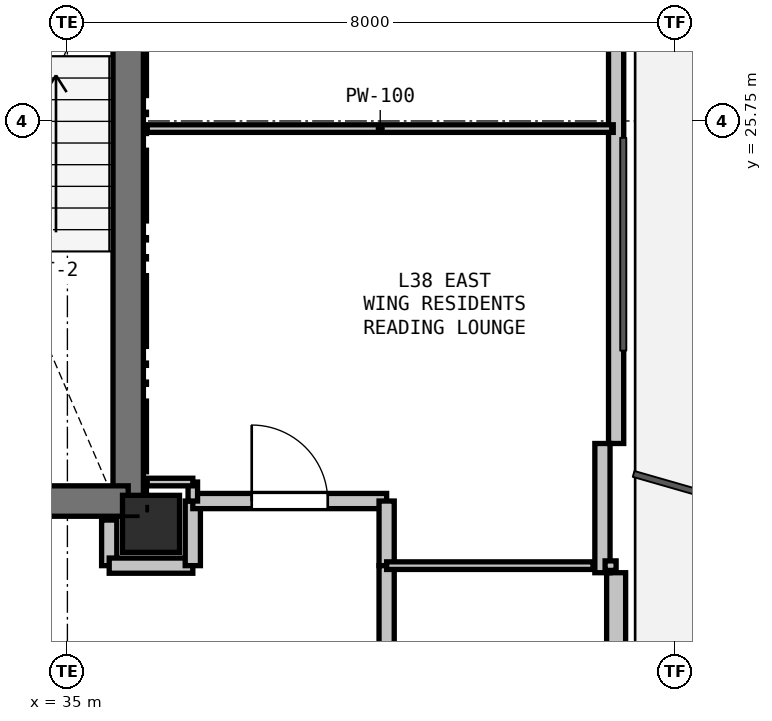
"""IFC4 building model, lengths in metres.
Left out: names, types, materials, properties, quantities, classifications, styles, units other than length and angle.
Written with IfcOpenShell. Run it as: python <this file> out.ifc"""

import sys

from ifc_helpers import new_model, si_unit, direction, frame, frame_2d, origin, origin_2d, place, context, subcontext, project, spatial, rectangle, extrude, element, fill, save


model = new_model("IFC4")
c1 = context("Model", 3, precision=1e-05, world=origin(), true_north=direction((0.0, 1.0)))
c2 = subcontext(c1, "Body", "Model", "MODEL_VIEW")
j1 = project(units=[si_unit("LENGTHUNIT", "METRE"), si_unit("PLANEANGLEUNIT", "RADIAN")], contexts=[c1])
p1 = place(None, origin())
s1 = spatial("IfcSite", under=j1, at=p1, CompositionType="ELEMENT")
p2 = place(p1, origin())
s2 = spatial("IfcBuilding", under=s1, at=p2, CompositionType="ELEMENT")
p3 = place(p2, frame((0.0, 0.0, 137.7)))
s3 = spatial("IfcBuildingStorey", under=s2, at=p3, CompositionType="ELEMENT", Elevation=137.7)
p4 = place(p3, frame((36.1, 20.45, 0.0), z_axis=(0.0, 0.0, 1.0), x_axis=(1.0, 0.0, 0.0)))
e1 = element("IfcColumn", 1, at=p4, inside=s3, PredefinedType="COLUMN", context=c2, shape_type="SweptSolid", body=[
    extrude(rectangle(XDim=0.75, YDim=0.75, at=origin_2d()), origin(), (0.0, 0.0, 1.0), 3.3),
])
p5 = place(p3, frame((42.219, 31.993, 0.0), z_axis=(0.0, 0.0, 1.0), x_axis=(0.0, -1.0, 0.0)))
e2 = element("IfcWall", 2, at=p5, inside=s3, PredefinedType="PARAPET", context=c2, shape_type="SweptSolid", body=[
    extrude(rectangle(XDim=10.486, YDim=0.2, at=frame_2d((5.243, 0.0))), origin(), (0.0, 0.0, 1.0), 0.2),
])
p6 = place(p3, frame((42.219, 19.807, 0.0), z_axis=(0.0, 0.0, 1.0), x_axis=(0.0, -1.0, 0.0)))
e3 = element("IfcWall", 3, at=p6, inside=s3, PredefinedType="SOLIDWALL", context=c2, shape_type="SweptSolid", body=[
    extrude(rectangle(XDim=11.186, YDim=0.25, at=frame_2d((5.593, 0.0))), origin(), (0.0, 0.0, 1.0), 2.68),
])
p7 = place(p6, frame((9.327, 0.0, 0.9)))
e4 = element("IfcOpeningElement", 4, at=p7, cuts=e3, PredefinedType="OPENING", context=c2, shape_type="SweptSolid", body=[
    extrude(rectangle(XDim=1.2, YDim=1.4, at=frame_2d((0.6, 0.7))), frame((0.0, 0.135, 0.0), z_axis=(0.0, -1.0, 0.0), x_axis=(1.0, 0.0, 0.0)), (0.0, 0.0, 1.0), 0.27),
])
p8 = place(p3, frame((42.039, 21.507, 0.0), z_axis=(0.0, 0.0, 1.0), x_axis=(0.0, -1.0, 0.0)))
e5 = element("IfcWall", 5, at=p8, inside=s3, PredefinedType="PARAPET", context=c2, shape_type="SweptSolid", body=[
    extrude(rectangle(XDim=1.7, YDim=0.2, at=frame_2d((0.85, 0.0))), origin(), (0.0, 0.0, 1.0), 2.68),
])
p9 = place(p3, frame((35.8, 28.1, 0.0), z_axis=(0.0, 0.0, 1.0), x_axis=(0.0, -1.0, 0.0)))
e6 = element("IfcWall", 6, at=p9, inside=s3, PredefinedType="SHEAR", context=c2, shape_type="SweptSolid", body=[
    extrude(rectangle(XDim=7.35, YDim=0.4, at=frame_2d((3.675, 0.0))), origin(), (0.0, 0.0, 1.0), 3.06),
])
p10 = place(p3, frame((35.8, 20.75, 0.0), z_axis=(0.0, 0.0, 1.0), x_axis=(-1.0, 0.0, 0.0)))
e7 = element("IfcWall", 7, at=p10, inside=s3, PredefinedType="SHEAR", context=c2, shape_type="SweptSolid", body=[
    extrude(rectangle(XDim=3.45, YDim=0.4, at=frame_2d((1.725, 0.0))), origin(), (0.0, 0.0, 1.0), 3.06),
])
p11 = place(p3, frame((35.55, 20.5, 0.0), z_axis=(0.0, 0.0, 1.0), x_axis=(0.0, -1.0, 0.0)))
e8 = element("IfcWall", 8, at=p11, inside=s3, PredefinedType="PARTITIONING", context=c2, shape_type="SweptSolid", body=[
    extrude(rectangle(XDim=0.6, YDim=0.2, at=frame_2d((0.3, 0.0))), origin(), (0.0, 0.0, 1.0), 2.508),
])
p12 = place(p3, frame((35.55, 19.9, 0.0), z_axis=(0.0, 0.0, 1.0), x_axis=(1.0, 0.0, 0.0)))
e9 = element("IfcWall", 9, at=p12, inside=s3, PredefinedType="PARTITIONING", context=c2, shape_type="SweptSolid", body=[
    extrude(rectangle(XDim=1.1, YDim=0.2, at=frame_2d((0.55, 0.0))), origin(), (0.0, 0.0, 1.0), 2.433),
])
p13 = place(p3, frame((36.65, 19.9, 0.0), z_axis=(0.0, 0.0, 1.0), x_axis=(0.0, 1.0, 0.0)))
e10 = element("IfcWall", 10, at=p13, inside=s3, PredefinedType="PARTITIONING", context=c2, shape_type="SweptSolid", body=[
    extrude(rectangle(XDim=0.85, YDim=0.2, at=frame_2d((0.425, 0.0))), origin(), (0.0, 0.0, 1.0), 3.06),
])
p14 = place(p3, frame((36.65, 20.75, 0.0), z_axis=(0.0, 0.0, 1.0), x_axis=(1.0, 0.0, 0.0)))
e11 = element("IfcWall", 11, at=p14, inside=s3, PredefinedType="PARTITIONING", context=c2, shape_type="SweptSolid", body=[
    extrude(rectangle(XDim=2.55, YDim=0.2, at=frame_2d((1.275, 0.0))), origin(), (0.0, 0.0, 1.0), 3.06),
])
p15 = place(p14, frame((0.775, 0.0, 0.0)))
e12 = element("IfcOpeningElement", 12, at=p15, cuts=e11, PredefinedType="OPENING", context=c2, shape_type="SweptSolid", body=[
    extrude(rectangle(XDim=1.0, YDim=2.15, at=frame_2d((0.5, 1.075))), frame((0.0, 0.11, 0.0), z_axis=(0.0, -1.0, 0.0), x_axis=(1.0, 0.0, 0.0)), (0.0, 0.0, 1.0), 0.22),
])
p16 = place(p3, frame((39.2, 20.75, 0.0), z_axis=(0.0, 0.0, 1.0), x_axis=(0.0, -1.0, 0.0)))
e13 = element("IfcWall", 13, at=p16, inside=s3, PredefinedType="PARTITIONING", context=c2, shape_type="SweptSolid", body=[
    extrude(rectangle(XDim=0.85, YDim=0.2, at=frame_2d((0.425, 0.0))), origin(), (0.0, 0.0, 1.0), 3.06),
])
p17 = place(p3, frame((39.2, 19.9, 0.0), z_axis=(0.0, 0.0, 1.0), x_axis=(0.0, -1.0, 0.0)))
e14 = element("IfcWall", 14, at=p17, inside=s3, PredefinedType="PARTITIONING", context=c2, shape_type="SweptSolid", body=[
    extrude(rectangle(XDim=1.75, YDim=0.2, at=frame_2d((0.875, 0.0))), origin(), (0.0, 0.0, 1.0), 3.06),
])
p18 = place(p3, frame((42.181, 25.65, 0.0), z_axis=(0.0, 0.0, 1.0), x_axis=(-1.0, 0.0, 0.0)))
e15 = element("IfcWall", 15, at=p18, inside=s3, PredefinedType="PARTITIONING", context=c2, shape_type="SweptSolid", body=[
    extrude(rectangle(XDim=6.131, YDim=0.1, at=frame_2d((3.065, 0.0))), origin(), (0.0, 0.0, 1.0), 2.365),
])
p19 = place(p3, frame((36.65, 20.75, 0.0), z_axis=(0.0, 0.0, 1.0), x_axis=(0.0, 1.0, 0.0)))
e16 = element("IfcWall", 16, at=p19, inside=s3, PredefinedType="PARTITIONING", context=c2, shape_type="SweptSolid", body=[
    extrude(rectangle(XDim=0.25, YDim=0.125, at=frame_2d((0.125, 0.0))), origin(), (0.0, 0.0, 1.0), 3.06),
])
p20 = place(p3, frame((36.65, 21.0, 0.0), z_axis=(0.0, 0.0, 1.0), x_axis=(-1.0, 0.0, 0.0)))
e17 = element("IfcWall", 17, at=p20, inside=s3, PredefinedType="PARTITIONING", context=c2, shape_type="SweptSolid", body=[
    extrude(rectangle(XDim=0.6, YDim=0.1, at=frame_2d((0.3, 0.0))), origin(), (0.0, 0.0, 1.0), 2.508),
])
p21 = place(p3, frame((42.219, 19.9, 0.0), z_axis=(0.0, 0.0, 1.0), x_axis=(-1.0, 0.0, 0.0)))
e18 = element("IfcWall", 18, at=p21, inside=s3, PredefinedType="PARTITIONING", context=c2, shape_type="SweptSolid", body=[
    extrude(rectangle(XDim=0.145, YDim=0.125, at=frame_2d((0.072, 0.0))), origin(), (0.0, 0.0, 1.0), 3.06),
])
p22 = place(p3, frame((41.915, 19.9, 0.0), z_axis=(0.0, 0.0, 1.0), x_axis=(-1.0, 0.0, 0.0)))
e19 = element("IfcWall", 19, at=p22, inside=s3, PredefinedType="PARTITIONING", context=c2, shape_type="SweptSolid", body=[
    extrude(rectangle(XDim=2.715, YDim=0.1, at=frame_2d((1.358, 0.0))), origin(), (0.0, 0.0, 1.0), 2.365),
])
p23 = place(p15, origin())
e20 = element("IfcDoor", 20, at=p23, inside=s3, OperationType="SINGLE_SWING_LEFT", PredefinedType="DOOR", context=c2, shape_type="SweptSolid", body=[
    extrude(rectangle(XDim=1.0, YDim=2.15, at=frame_2d((0.5, 1.075))), frame((0.0, 0.025, 0.0), z_axis=(0.0, -1.0, 0.0), x_axis=(1.0, 0.0, 0.0)), (0.0, 0.0, 1.0), 0.05),
])
fill(e12, e20)
save(model, sys.argv[1])
